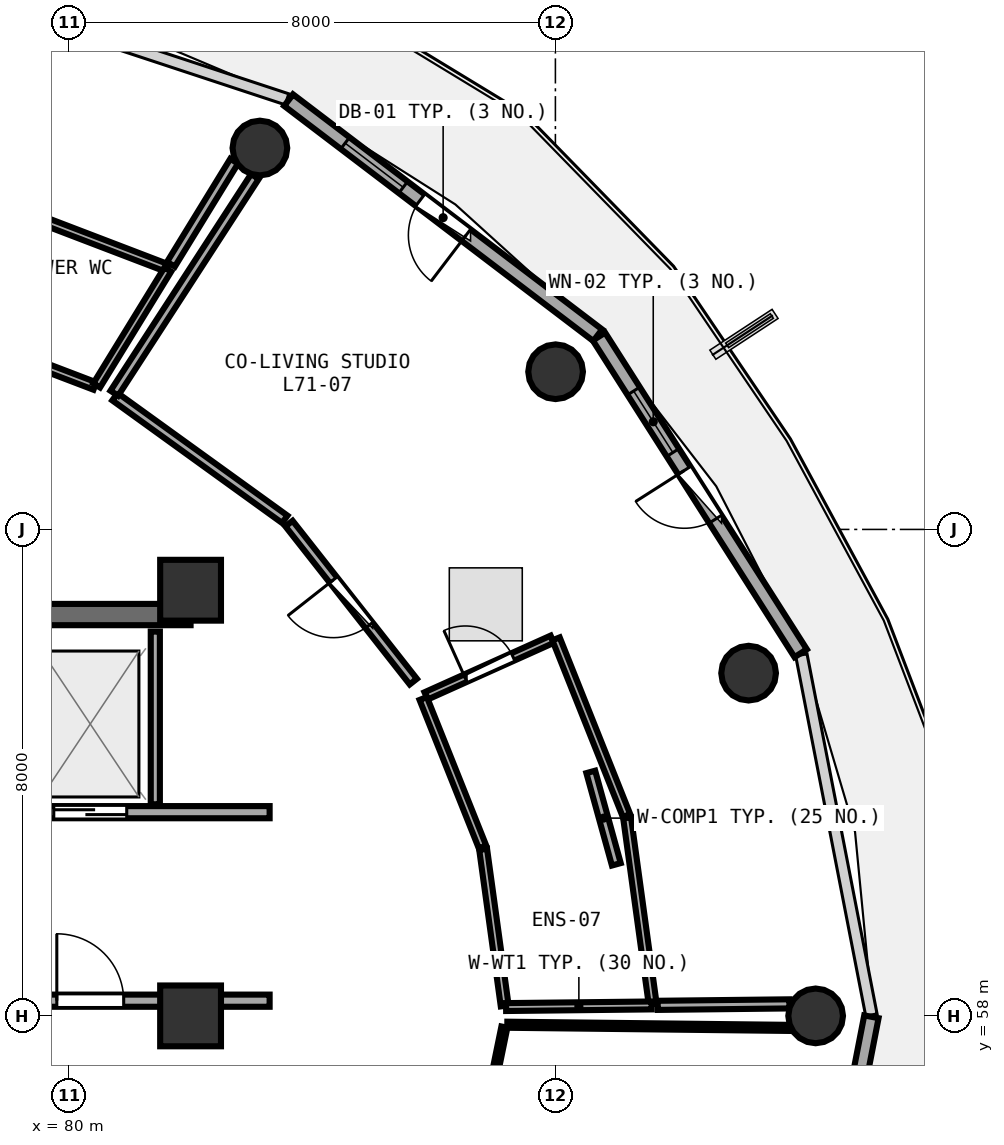
"""IFC4 building model, lengths in metres.
Left out: names, types, materials, properties, quantities, classifications, styles, units other than length and angle.
Written with IfcOpenShell. Run it as: python <this file> out.ifc"""

import sys

from ifc_helpers import new_model, si_unit, direction, frame, frame_2d, origin, origin_2d, place, context, subcontext, project, spatial, rectangle, circle, extrude, element, fill, save


model = new_model("IFC4")
c1 = context("Model", 3, precision=1e-05, world=origin(), true_north=direction((0.0, 1.0)))
c2 = subcontext(c1, "Body", "Model", "MODEL_VIEW")
j1 = project(units=[si_unit("LENGTHUNIT", "METRE"), si_unit("PLANEANGLEUNIT", "RADIAN")], contexts=[c1])
p1 = place(None, origin())
s1 = spatial("IfcSite", under=j1, at=p1, CompositionType="ELEMENT")
p2 = place(p1, origin())
s2 = spatial("IfcBuilding", under=s1, at=p2, CompositionType="ELEMENT")
p3 = place(p2, frame((0.0, 0.0, 278.7)))
s3 = spatial("IfcBuildingStorey", under=s2, at=p3, CompositionType="ELEMENT", Elevation=278.7)
for number, where, z_axis, x_axis in (
    (1, (82.0, 58.0, 0.0), (0.0, 0.0, 1.0), (1.0, 0.0, 0.0)),
    (2, (82.0, 65.0, 0.0), (0.0, 0.0, 1.0), (1.0, 0.0, 0.0)),
):
    element("IfcColumn", number, at=place(p3, frame(where, z_axis=z_axis, x_axis=x_axis)), inside=s3, PredefinedType="PILASTER", context=c2, shape_type="SweptSolid", body=[
        extrude(rectangle(XDim=1.0, YDim=1.0, at=origin_2d()), origin(), (0.0, 0.0, 1.0), 3.75),
    ])
for number, where, z_axis, x_axis in (
    (3, (92.28, 58.0, 0.0), (0.0, 0.0, 1.0), (1.0, 0.0, 0.0)),
    (4, (91.177, 63.636, 0.0), (0.0, 0.0, 1.0), (1.0, 0.0, 0.0)),
    (5, (88.003, 68.593, 0.0), (0.0, 0.0, 1.0), (1.0, 0.0, 0.0)),
    (6, (83.14, 72.272, 0.0), (0.0, 0.0, 1.0), (1.0, 0.0, 0.0)),
):
    element("IfcColumn", number, at=place(p3, frame(where, z_axis=z_axis, x_axis=x_axis)), inside=s3, PredefinedType="COLUMN", context=c2, shape_type="SweptSolid", body=[
        extrude(circle(Radius=0.45, at=origin_2d()), origin(), (0.0, 0.0, 1.0), 3.75),
    ])
p4 = place(p3, frame((92.034, 63.964, 0.0), z_axis=(0.0, 0.0, 1.0), x_axis=(-0.537271968456, 0.843409053728, 0.0)))
e7 = element("IfcWall", 7, at=p4, inside=s3, PredefinedType="SOLIDWALL", context=c2, shape_type="SweptSolid", body=[
    extrude(rectangle(XDim=6.175, YDim=0.24, at=frame_2d((3.087, 0.0))), origin(), (0.0, 0.0, 1.0), 3.475),
])
p5 = place(p4, frame((2.613, 0.0, 0.0)))
e8 = element("IfcOpeningElement", 8, at=p5, cuts=e7, PredefinedType="OPENING", context=c2, shape_type="SweptSolid", body=[
    extrude(rectangle(XDim=0.95, YDim=2.1, at=frame_2d((0.475, 1.05))), frame((0.0, 0.13, 0.0), z_axis=(0.0, -1.0, 0.0), x_axis=(1.0, 0.0, 0.0)), (0.0, 0.0, 1.0), 0.26),
])
p6 = place(p4, frame((3.913, 0.0, 0.85)))
e9 = element("IfcOpeningElement", 9, at=p6, cuts=e7, PredefinedType="OPENING", context=c2, shape_type="SweptSolid", body=[
    extrude(rectangle(XDim=1.2, YDim=1.45, at=frame_2d((0.6, 0.725))), frame((0.0, 0.13, 0.0), z_axis=(0.0, -1.0, 0.0), x_axis=(1.0, 0.0, 0.0)), (0.0, 0.0, 1.0), 0.26),
])
p7 = place(p3, frame((88.696, 69.194, 0.0), z_axis=(0.0, 0.0, 1.0), x_axis=(-0.796010444211, 0.605282886514, 0.0)))
e10 = element("IfcWall", 10, at=p7, inside=s3, PredefinedType="SOLIDWALL", context=c2, shape_type="SweptSolid", body=[
    extrude(rectangle(XDim=6.387, YDim=0.24, at=frame_2d((3.194, 0.0))), origin(), (0.0, 0.0, 1.0), 3.475),
])
p8 = place(p7, frame((2.719, 0.0, 0.0)))
e11 = element("IfcOpeningElement", 11, at=p8, cuts=e10, PredefinedType="OPENING", context=c2, shape_type="SweptSolid", body=[
    extrude(rectangle(XDim=0.95, YDim=2.1, at=frame_2d((0.475, 1.05))), frame((0.0, 0.13, 0.0), z_axis=(0.0, -1.0, 0.0), x_axis=(1.0, 0.0, 0.0)), (0.0, 0.0, 1.0), 0.26),
])
p9 = place(p7, frame((4.019, 0.0, 0.85)))
e12 = element("IfcOpeningElement", 12, at=p9, cuts=e10, PredefinedType="OPENING", context=c2, shape_type="SweptSolid", body=[
    extrude(rectangle(XDim=1.2, YDim=1.45, at=frame_2d((0.6, 0.725))), frame((0.0, 0.13, 0.0), z_axis=(0.0, -1.0, 0.0), x_axis=(1.0, 0.0, 0.0)), (0.0, 0.0, 1.0), 0.26),
])
p10 = place(p3, frame((92.045, 52.063, 0.0), z_axis=(0.0, 0.0, 1.0), x_axis=(0.190969309115, 0.981596008028, 0.0)))
e13 = element("IfcWall", 13, at=p10, inside=s3, PredefinedType="SOLIDWALL", context=c2, shape_type="SweptSolid", body=[
    extrude(rectangle(XDim=6.033, YDim=0.24, at=frame_2d((3.017, 0.0))), origin(), (0.0, 0.0, 1.0), 3.475),
])
p11 = place(p10, frame((2.216, 0.0, 0.85)))
e14 = element("IfcOpeningElement", 14, at=p11, cuts=e13, PredefinedType="OPENING", context=c2, shape_type="SweptSolid", body=[
    extrude(rectangle(XDim=1.6, YDim=1.45, at=frame_2d((0.8, 0.725))), frame((0.0, 0.13, 0.0), z_axis=(0.0, -1.0, 0.0), x_axis=(1.0, 0.0, 0.0)), (0.0, 0.0, 1.0), 0.26),
])
p12 = place(p3, frame((74.0, 64.6, 0.0), z_axis=(0.0, 0.0, 1.0), x_axis=(1.0, 0.0, 0.0)))
e15 = element("IfcWall", 15, at=p12, inside=s3, PredefinedType="SHEAR", context=c2, shape_type="SweptSolid", body=[
    extrude(rectangle(XDim=8.0, YDim=0.35, at=frame_2d((4.0, 0.0))), origin(), (0.0, 0.0, 1.0), 3.49),
])
p13 = place(p3, frame((79.3, 61.35, 0.0), z_axis=(0.0, 0.0, 1.0), x_axis=(1.0, 0.0, 0.0)))
e16 = element("IfcWall", 16, at=p13, inside=s3, PredefinedType="SOLIDWALL", context=c2, shape_type="SweptSolid", body=[
    extrude(rectangle(XDim=4.0, YDim=0.2, at=frame_2d((2.0, 0.0))), origin(), (0.0, 0.0, 1.0), 2.775),
])
p14 = place(p13, frame((0.45, 0.0, 0.0)))
e17 = element("IfcOpeningElement", 17, at=p14, cuts=e16, PredefinedType="OPENING", context=c2, shape_type="SweptSolid", body=[
    extrude(rectangle(XDim=1.2, YDim=2.15, at=frame_2d((0.6, 1.075))), frame((0.0, 0.11, 0.0), z_axis=(0.0, -1.0, 0.0), x_axis=(1.0, 0.0, 0.0)), (0.0, 0.0, 1.0), 0.22),
])
p15 = place(p3, frame((81.42, 61.48, 0.0), z_axis=(0.0, 0.0, 1.0), x_axis=(0.0, 1.0, 0.0)))
e18 = element("IfcWall", 18, at=p15, inside=s3, PredefinedType="PARTITIONING", context=c2, shape_type="SweptSolid", body=[
    extrude(rectangle(XDim=2.84, YDim=0.15, at=frame_2d((1.42, 0.0))), origin(), (0.0, 0.0, 1.0), 3.48),
])
p16 = place(p3, frame((79.3, 58.25, 0.0), z_axis=(0.0, 0.0, 1.0), x_axis=(1.0, 0.0, 0.0)))
e19 = element("IfcWall", 19, at=p16, inside=s3, PredefinedType="SOLIDWALL", context=c2, shape_type="SweptSolid", body=[
    extrude(rectangle(XDim=4.0, YDim=0.2, at=frame_2d((2.0, 0.0))), origin(), (0.0, 0.0, 1.0), 2.775),
])
p17 = place(p16, frame((0.5, 0.0, 0.0)))
e20 = element("IfcOpeningElement", 20, at=p17, cuts=e19, PredefinedType="OPENING", context=c2, shape_type="SweptSolid", body=[
    extrude(rectangle(XDim=1.1, YDim=2.1, at=frame_2d((0.55, 1.05))), frame((0.0, 0.11, 0.0), z_axis=(0.0, -1.0, 0.0), x_axis=(1.0, 0.0, 0.0)), (0.0, 0.0, 1.0), 0.22),
])
p18 = place(p3, frame((85.874, 63.263, 0.0), z_axis=(0.0, 0.0, 1.0), x_axis=(0.912228594958, 0.409681572127, 0.0)))
e21 = element("IfcWall", 21, at=p18, inside=s3, PredefinedType="PLUMBINGWALL", context=c2, shape_type="SweptSolid", body=[
    extrude(rectangle(XDim=2.274, YDim=0.13, at=frame_2d((1.137, 0.0))), origin(), (0.0, 0.0, 1.0), 3.075),
])
p19 = place(p18, frame((0.707, 0.0, 0.0)))
e22 = element("IfcOpeningElement", 22, at=p19, cuts=e21, PredefinedType="OPENING", context=c2, shape_type="SweptSolid", body=[
    extrude(rectangle(XDim=0.86, YDim=2.05, at=frame_2d((0.43, 1.025))), frame((0.0, 0.075, 0.0), z_axis=(0.0, -1.0, 0.0), x_axis=(1.0, 0.0, 0.0)), (0.0, 0.0, 1.0), 0.15),
])
p20 = place(p3, frame((85.663, 63.497, 0.0), z_axis=(0.0, 0.0, 1.0), x_axis=(-0.618216128683, 0.786008154052, 0.0)))
e23 = element("IfcWall", 23, at=p20, inside=s3, PredefinedType="PARTITIONING", context=c2, shape_type="SweptSolid", body=[
    extrude(rectangle(XDim=3.306, YDim=0.15, at=frame_2d((1.653, 0.0))), origin(), (0.0, 0.0, 1.0), 3.075),
])
p21 = place(p20, frame((1.178, 0.0, 0.0)))
e24 = element("IfcOpeningElement", 24, at=p21, cuts=e23, PredefinedType="OPENING", context=c2, shape_type="SweptSolid", body=[
    extrude(rectangle(XDim=0.95, YDim=2.08, at=frame_2d((0.475, 1.04))), frame((0.0, 0.085, 0.0), z_axis=(0.0, -1.0, 0.0), x_axis=(1.0, 0.0, 0.0)), (0.0, 0.0, 1.0), 0.17),
])
p22 = place(p3, frame((80.426, 68.358, 0.0), z_axis=(0.0, 0.0, 1.0), x_axis=(-0.934318832382, 0.35643838101, 0.0)))
e25 = element("IfcWall", 25, at=p22, inside=s3, PredefinedType="PLUMBINGWALL", context=c2, shape_type="SweptSolid", body=[
    extrude(rectangle(XDim=2.841, YDim=0.13, at=frame_2d((1.42, 0.0))), origin(), (0.0, 0.0, 1.0), 3.48),
])
p23 = place(p3, frame((78.466, 71.503, 0.0), z_axis=(0.0, 0.0, 1.0), x_axis=(0.934061774164, -0.357111470057, 0.0)))
e26 = element("IfcWall", 26, at=p23, inside=s3, PredefinedType="PLUMBINGWALL", context=c2, shape_type="SweptSolid", body=[
    extrude(rectangle(XDim=3.374, YDim=0.13, at=frame_2d((1.687, 0.0))), origin(), (0.0, 0.0, 1.0), 3.48),
])
p24 = place(p3, frame((81.625, 70.274, 0.0), z_axis=(0.0, 0.0, 1.0), x_axis=(-0.523122555159, -0.852257468306, 0.0)))
e27 = element("IfcWall", 27, at=p24, inside=s3, PredefinedType="PLUMBINGWALL", context=c2, shape_type="SweptSolid", body=[
    extrude(rectangle(XDim=2.236, YDim=0.13, at=frame_2d((1.118, 0.0))), origin(), (0.0, 0.0, 1.0), 3.175),
])
p25 = place(p3, frame((82.717, 72.056, 0.0), z_axis=(0.0, 0.0, 1.0), x_axis=(-0.522809528722, -0.852449527349, 0.0)))
e28 = element("IfcWall", 28, at=p25, inside=s3, PredefinedType="PARTITIONING", context=c2, shape_type="SweptSolid", body=[
    extrude(rectangle(XDim=1.989, YDim=0.15, at=frame_2d((0.995, 0.0))), origin(), (0.0, 0.0, 1.0), 3.235),
])
p26 = place(p3, frame((86.365, 53.934, 0.0), z_axis=(0.0, 0.0, 1.0), x_axis=(0.200853183429, 0.979621354762, 0.0)))
e29 = element("IfcWall", 29, at=p26, inside=s3, PredefinedType="PARTITIONING", context=c2, shape_type="SweptSolid", body=[
    extrude(rectangle(XDim=3.963, YDim=0.1, at=frame_2d((1.981, 0.0))), origin(), (0.0, 0.0, 1.0), 3.48),
])
p27 = place(p3, frame((87.209, 57.854, 0.0), z_axis=(0.0, 0.0, 1.0), x_axis=(0.999937174585, -0.01120923205, 0.0)))
e30 = element("IfcWall", 30, at=p27, inside=s3, PredefinedType="PARTITIONING", context=c2, shape_type="SweptSolid", body=[
    extrude(rectangle(XDim=4.639, YDim=0.1, at=frame_2d((2.32, 0.0))), origin(), (0.0, 0.0, 1.0), 3.075),
])
p28 = place(p3, frame((87.166, 58.165, 0.0), z_axis=(0.0, 0.0, 1.0), x_axis=(-0.13640850471, 0.990652673667, 0.0)))
e31 = element("IfcWall", 31, at=p28, inside=s3, PredefinedType="PLUMBINGWALL", context=c2, shape_type="SweptSolid", body=[
    extrude(rectangle(XDim=2.599, YDim=0.13, at=frame_2d((1.299, 0.0))), origin(), (0.0, 0.0, 1.0), 3.075),
])
p29 = place(p3, frame((86.802, 60.778, 0.0), z_axis=(0.0, 0.0, 1.0), x_axis=(-0.370846314423, 0.92869425059, 0.0)))
e32 = element("IfcWall", 32, at=p29, inside=s3, PredefinedType="PLUMBINGWALL", context=c2, shape_type="SweptSolid", body=[
    extrude(rectangle(XDim=2.629, YDim=0.13, at=frame_2d((1.315, 0.0))), origin(), (0.0, 0.0, 1.0), 3.48),
])
p30 = place(p3, frame((88.01, 64.2, 0.0), z_axis=(0.0, 0.0, 1.0), x_axis=(0.370529396103, -0.928820739768, 0.0)))
e33 = element("IfcWall", 33, at=p30, inside=s3, PredefinedType="PLUMBINGWALL", context=c2, shape_type="SweptSolid", body=[
    extrude(rectangle(XDim=3.128, YDim=0.13, at=frame_2d((1.564, 0.0))), origin(), (0.0, 0.0, 1.0), 3.075),
])
p31 = place(p3, frame((89.18, 61.256, 0.0), z_axis=(0.0, 0.0, 1.0), x_axis=(0.13600432659, -0.990708243202, 0.0)))
e34 = element("IfcWall", 34, at=p31, inside=s3, PredefinedType="PLUMBINGWALL", context=c2, shape_type="SweptSolid", body=[
    extrude(rectangle(XDim=3.093, YDim=0.13, at=frame_2d((1.546, 0.0))), origin(), (0.0, 0.0, 1.0), 3.48),
])
p32 = place(p3, frame((89.583, 58.172, 0.0), z_axis=(0.0, 0.0, 1.0), x_axis=(-0.999938226959, -0.011114956836, 0.0)))
e35 = element("IfcWall", 35, at=p32, inside=s3, PredefinedType="PLUMBINGWALL", context=c2, shape_type="SweptSolid", body=[
    extrude(rectangle(XDim=2.394, YDim=0.13, at=frame_2d((1.197, 0.0))), origin(), (0.0, 0.0, 1.0), 3.075),
])
p33 = place(p3, frame((83.55, 66.167, 0.0), z_axis=(0.0, 0.0, 1.0), x_axis=(-0.810845521854, 0.585260232451, 0.0)))
e36 = element("IfcWall", 36, at=p33, inside=s3, PredefinedType="PARTITIONING", context=c2, shape_type="SweptSolid", body=[
    extrude(rectangle(XDim=3.445, YDim=0.15, at=frame_2d((1.722, 0.0))), origin(), (0.0, 0.0, 1.0), 3.075),
])
p34 = place(p3, frame((80.746, 68.24, 0.0), z_axis=(0.0, 0.0, 1.0), x_axis=(0.544234825024, 0.838932926539, 0.0)))
e37 = element("IfcWall", 37, at=p34, inside=s3, PredefinedType="PARTITIONING", context=c2, shape_type="SweptSolid", body=[
    extrude(rectangle(XDim=4.249, YDim=0.15, at=frame_2d((2.125, 0.0))), origin(), (0.0, 0.0, 1.0), 3.075),
])
p35 = place(p3, frame((91.848, 58.198, 0.0), z_axis=(0.0, 0.0, 1.0), x_axis=(-0.999937677283, -0.011164297964, 0.0)))
e38 = element("IfcWall", 38, at=p35, inside=s3, PredefinedType="PARTITIONING", context=c2, shape_type="SweptSolid", body=[
    extrude(rectangle(XDim=2.165, YDim=0.15, at=frame_2d((1.083, 0.0))), origin(), (0.0, 0.0, 1.0), 3.075),
])
p36 = place(p3, frame((89.002, 60.492, 0.0), z_axis=(0.0, 0.0, 1.0), x_axis=(-0.266469764124, 0.963843278136, 0.0)))
e39 = element("IfcWall", 39, at=p36, inside=s3, PredefinedType="PARTITIONING", context=c2, shape_type="SweptSolid", body=[
    extrude(rectangle(XDim=1.577, YDim=0.15, at=frame_2d((0.789, 0.0))), origin(), (0.0, 0.0, 1.0), 3.48),
])
p37 = place(p5, frame((0.95, 0.0, 0.0), z_axis=(0.0, 0.0, 1.0), x_axis=(-1.0, 0.0, 0.0)))
e40 = element("IfcDoor", 40, at=p37, inside=s3, OperationType="SINGLE_SWING_LEFT", PredefinedType="DOOR", context=c2, shape_type="SweptSolid", body=[
    extrude(rectangle(XDim=0.95, YDim=2.1, at=frame_2d((0.475, 1.05))), frame((0.0, 0.025, 0.0), z_axis=(0.0, -1.0, 0.0), x_axis=(1.0, 0.0, 0.0)), (0.0, 0.0, 1.0), 0.05),
])
fill(e8, e40)
p38 = place(p6, origin())
e41 = element("IfcWindow", 41, at=p38, inside=s3, PartitioningType="SINGLE_PANEL", PredefinedType="WINDOW", context=c2, shape_type="SweptSolid", body=[
    extrude(rectangle(XDim=1.2, YDim=1.45, at=frame_2d((0.6, 0.725))), frame((0.0, 0.03, 0.0), z_axis=(0.0, -1.0, 0.0), x_axis=(1.0, 0.0, 0.0)), (0.0, 0.0, 1.0), 0.06),
])
fill(e9, e41)
p39 = place(p8, frame((0.95, 0.0, 0.0), z_axis=(0.0, 0.0, 1.0), x_axis=(-1.0, 0.0, 0.0)))
e42 = element("IfcDoor", 42, at=p39, inside=s3, OperationType="SINGLE_SWING_RIGHT", PredefinedType="DOOR", context=c2, shape_type="SweptSolid", body=[
    extrude(rectangle(XDim=0.95, YDim=2.1, at=frame_2d((0.475, 1.05))), frame((0.0, 0.025, 0.0), z_axis=(0.0, -1.0, 0.0), x_axis=(1.0, 0.0, 0.0)), (0.0, 0.0, 1.0), 0.05),
])
fill(e11, e42)
p40 = place(p9, origin())
e43 = element("IfcWindow", 43, at=p40, inside=s3, PartitioningType="SINGLE_PANEL", PredefinedType="WINDOW", context=c2, shape_type="SweptSolid", body=[
    extrude(rectangle(XDim=1.2, YDim=1.45, at=frame_2d((0.6, 0.725))), frame((0.0, 0.03, 0.0), z_axis=(0.0, -1.0, 0.0), x_axis=(1.0, 0.0, 0.0)), (0.0, 0.0, 1.0), 0.06),
])
fill(e12, e43)
p41 = place(p14, origin())
e44 = element("IfcDoor", 44, at=p41, inside=s3, OperationType="DOUBLE_DOOR_SLIDING", PredefinedType="DOOR", context=c2, shape_type="SweptSolid", body=[
    extrude(rectangle(XDim=1.2, YDim=2.15, at=frame_2d((0.6, 1.075))), frame((0.0, 0.025, 0.0), z_axis=(0.0, -1.0, 0.0), x_axis=(1.0, 0.0, 0.0)), (0.0, 0.0, 1.0), 0.05),
])
fill(e17, e44)
p42 = place(p17, frame((1.1, 0.0, 0.0), z_axis=(0.0, 0.0, 1.0), x_axis=(-1.0, 0.0, 0.0)))
e45 = element("IfcDoor", 45, at=p42, inside=s3, OperationType="SINGLE_SWING_RIGHT", PredefinedType="DOOR", context=c2, shape_type="SweptSolid", body=[
    extrude(rectangle(XDim=1.1, YDim=2.1, at=frame_2d((0.55, 1.05))), frame((0.0, 0.025, 0.0), z_axis=(0.0, -1.0, 0.0), x_axis=(1.0, 0.0, 0.0)), (0.0, 0.0, 1.0), 0.05),
])
fill(e20, e45)
p43 = place(p19, origin())
e46 = element("IfcDoor", 46, at=p43, inside=s3, OperationType="SINGLE_SWING_LEFT", PredefinedType="DOOR", context=c2, shape_type="SweptSolid", body=[
    extrude(rectangle(XDim=0.86, YDim=2.05, at=frame_2d((0.43, 1.025))), frame((0.0, 0.025, 0.0), z_axis=(0.0, -1.0, 0.0), x_axis=(1.0, 0.0, 0.0)), (0.0, 0.0, 1.0), 0.05),
])
fill(e22, e46)
p44 = place(p21, origin())
e47 = element("IfcDoor", 47, at=p44, inside=s3, OperationType="SINGLE_SWING_RIGHT", PredefinedType="DOOR", context=c2, shape_type="SweptSolid", body=[
    extrude(rectangle(XDim=0.95, YDim=2.08, at=frame_2d((0.475, 1.04))), frame((0.0, 0.025, 0.0), z_axis=(0.0, -1.0, 0.0), x_axis=(1.0, 0.0, 0.0)), (0.0, 0.0, 1.0), 0.05),
])
fill(e24, e47)
save(model, sys.argv[1])
